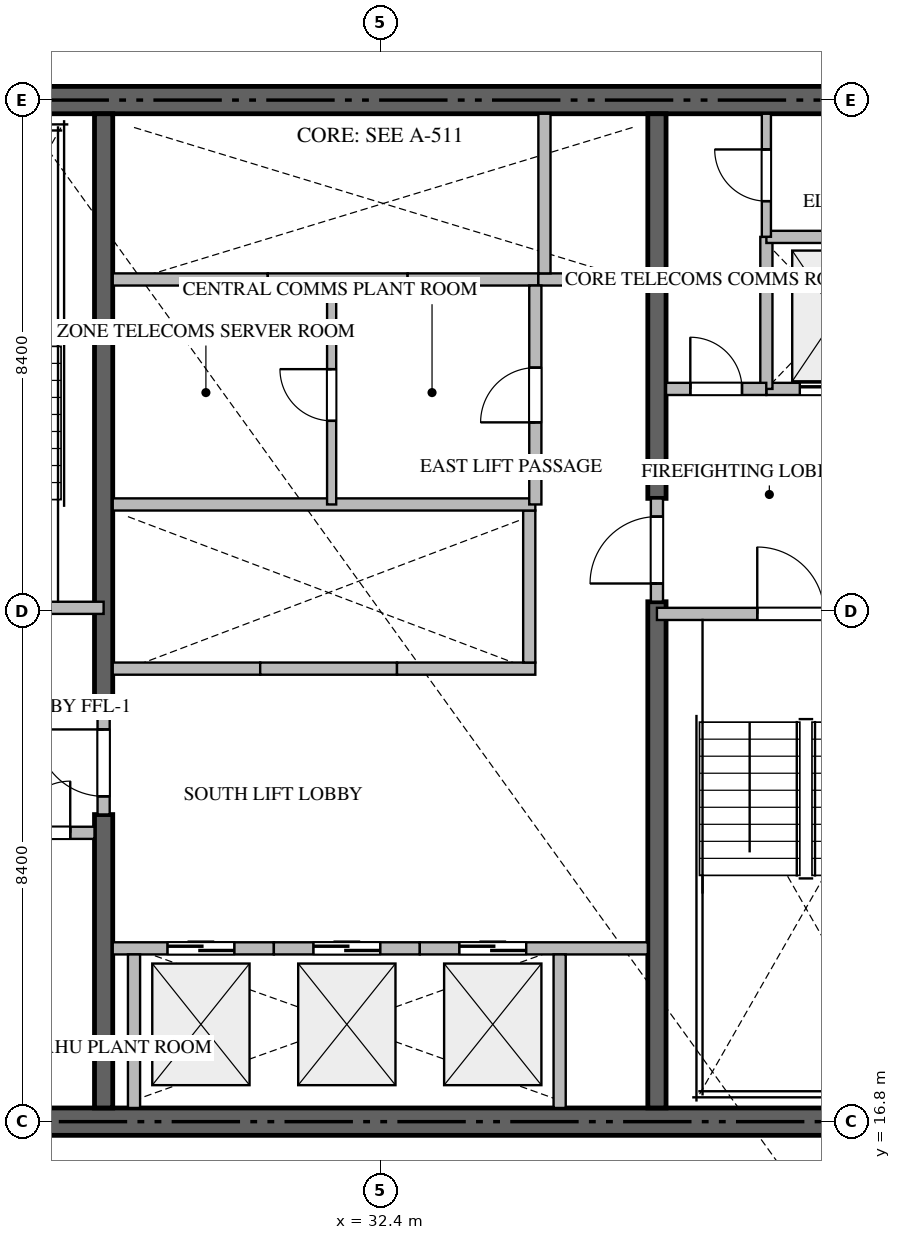
"""IFC4 building model, lengths in metres.
Left out: names, types, materials, properties, quantities, classifications, styles, units other than length and angle.
Written with IfcOpenShell. Run it as: python <this file> out.ifc"""

import sys

from ifc_helpers import new_model, si_unit, direction, frame, frame_2d, origin, place, context, subcontext, project, spatial, rectangle, extrude, source, transform, mapped, element, fill, save


model = new_model("IFC4")
c1 = context("Model", 3, precision=1e-05, world=origin(), true_north=direction((0.0, 1.0)))
c2 = subcontext(c1, "Body", "Model", "MODEL_VIEW")
j1 = project(units=[si_unit("LENGTHUNIT", "METRE"), si_unit("PLANEANGLEUNIT", "RADIAN")], contexts=[c1])
p1 = place(None, origin())
s1 = spatial("IfcSite", under=j1, at=p1, CompositionType="ELEMENT")
p2 = place(p1, origin())
s2 = spatial("IfcBuilding", under=s1, at=p2, CompositionType="ELEMENT")
p3 = place(p2, frame((0.0, 0.0, 90.45)))
s3 = spatial("IfcBuildingStorey", under=s2, at=p3, CompositionType="ELEMENT", Elevation=90.45)
for number, where, z_axis, x_axis in (
    (1, (23.4, 16.8, -0.26), (0.0, 0.0, 1.0), (1.0, 0.0, 0.0)),
    (2, (41.4, 33.6, -0.26), (0.0, 0.0, 1.0), (-1.0, 0.0, 0.0)),
):
    element("IfcWall", number, at=place(p3, frame(where, z_axis=z_axis, x_axis=x_axis)), inside=s3, PredefinedType="SHEAR", context=c2, shape_type="SweptSolid", body=[
        extrude(rectangle(XDim=18.0, YDim=0.45, at=frame_2d((9.0, 0.0))), origin(), (0.0, 0.0, 1.0), 3.748),
    ])
p4 = place(p3, frame((27.85, 17.025, -0.26), z_axis=(0.0, 0.0, 1.0), x_axis=(0.0, 1.0, 0.0)))
e3 = element("IfcWall", 3, at=p4, inside=s3, PredefinedType="SHEAR", context=c2, shape_type="SweptSolid", body=[
    extrude(rectangle(XDim=4.825, YDim=0.3, at=frame_2d((2.413, 0.0))), origin(), (0.0, 0.0, 1.0), 3.748),
])
p5 = place(p3, frame((27.85, 23.55, -0.26), z_axis=(0.0, 0.0, 1.0), x_axis=(0.0, 1.0, 0.0)))
e4 = element("IfcWall", 4, at=p5, inside=s3, PredefinedType="SHEAR", context=c2, shape_type="SweptSolid", body=[
    extrude(rectangle(XDim=9.825, YDim=0.3, at=frame_2d((4.913, 0.0))), origin(), (0.0, 0.0, 1.0), 3.748),
])
p6 = place(p3, frame((36.95, 17.025, -0.26), z_axis=(0.0, 0.0, 1.0), x_axis=(0.0, 1.0, 0.0)))
e5 = element("IfcWall", 5, at=p6, inside=s3, PredefinedType="SHEAR", context=c2, shape_type="SweptSolid", body=[
    extrude(rectangle(XDim=8.325, YDim=0.3, at=frame_2d((4.163, 0.0))), origin(), (0.0, 0.0, 1.0), 3.748),
])
p7 = place(p3, frame((36.95, 27.05, -0.26), z_axis=(0.0, 0.0, 1.0), x_axis=(0.0, 1.0, 0.0)))
e6 = element("IfcWall", 6, at=p7, inside=s3, PredefinedType="SHEAR", context=c2, shape_type="SweptSolid", body=[
    extrude(rectangle(XDim=6.325, YDim=0.3, at=frame_2d((3.163, 0.0))), origin(), (0.0, 0.0, 1.0), 3.748),
])
p8 = place(p3, frame((23.4, 25.25, 0.0), z_axis=(0.0, 0.0, 1.0), x_axis=(1.0, 0.0, 0.0)))
e7 = element("IfcWall", 7, at=p8, inside=s3, PredefinedType="STANDARD", context=c2, shape_type="SweptSolid", body=[
    extrude(rectangle(XDim=4.45, YDim=0.2, at=frame_2d((2.225, 0.0))), origin(), (0.0, 0.0, 1.0), 3.49),
])
p9 = place(p8, frame((1.65, 0.0, 0.0)))
e8 = element("IfcOpeningElement", 8, at=p9, cuts=e7, PredefinedType="OPENING", context=c2, shape_type="SweptSolid", body=[
    extrude(rectangle(XDim=1.1, YDim=2.15, at=frame_2d((0.55, 1.075))), frame((0.0, 0.11, 0.0), z_axis=(0.0, -1.0, 0.0), x_axis=(1.0, 0.0, 0.0)), (0.0, 0.0, 1.0), 0.22),
])
p10 = place(p3, frame((36.95, 25.15, 0.0), z_axis=(0.0, 0.0, 1.0), x_axis=(1.0, 0.0, 0.0)))
e9 = element("IfcWall", 9, at=p10, inside=s3, PredefinedType="STANDARD", context=c2, shape_type="SweptSolid", body=[
    extrude(rectangle(XDim=4.45, YDim=0.2, at=frame_2d((2.225, 0.0))), origin(), (0.0, 0.0, 1.0), 3.49),
])
p11 = place(p10, frame((1.65, 0.0, 0.0)))
e10 = element("IfcOpeningElement", 10, at=p11, cuts=e9, PredefinedType="OPENING", context=c2, shape_type="SweptSolid", body=[
    extrude(rectangle(XDim=1.1, YDim=2.15, at=frame_2d((0.55, 1.075))), frame((0.0, 0.11, 0.0), z_axis=(0.0, -1.0, 0.0), x_axis=(1.0, 0.0, 0.0)), (0.0, 0.0, 1.0), 0.22),
])
p12 = place(p3, frame((38.75, 28.85, 0.0), z_axis=(0.0, 0.0, 1.0), x_axis=(1.0, 0.0, 0.0)))
e11 = element("IfcWall", 11, at=p12, inside=s3, PredefinedType="STANDARD", context=c2, shape_type="SweptSolid", body=[
    extrude(rectangle(XDim=2.425, YDim=0.2, at=frame_2d((1.212, 0.0))), origin(), (0.0, 0.0, 1.0), 3.49),
])
p13 = place(p12, frame((0.55, 0.0, 0.0)))
e12 = element("IfcOpeningElement", 12, at=p13, cuts=e11, PredefinedType="OPENING", context=c2, shape_type="SweptSolid", body=[
    extrude(rectangle(XDim=1.2, YDim=2.2, at=frame_2d((0.6, 1.1))), frame((0.0, 0.11, 0.0), z_axis=(0.0, -1.0, 0.0), x_axis=(1.0, 0.0, 0.0)), (0.0, 0.0, 1.0), 0.22),
])
p14 = place(p3, frame((28.0, 19.65, 0.0), z_axis=(0.0, 0.0, 1.0), x_axis=(1.0, 0.0, 0.0)))
e13 = element("IfcWall", 13, at=p14, inside=s3, PredefinedType="STANDARD", context=c2, shape_type="SweptSolid", body=[
    extrude(rectangle(XDim=2.65, YDim=0.2, at=frame_2d((1.325, 0.0))), origin(), (0.0, 0.0, 1.0), 3.49),
])
p15 = place(p14, frame((0.9, 0.0, 0.0)))
e14 = element("IfcOpeningElement", 14, at=p15, cuts=e13, PredefinedType="OPENING", context=c2, shape_type="SweptSolid", body=[
    extrude(rectangle(XDim=1.1, YDim=2.2, at=frame_2d((0.55, 1.1))), frame((0.0, 0.11, 0.0), z_axis=(0.0, -1.0, 0.0), x_axis=(1.0, 0.0, 0.0)), (0.0, 0.0, 1.0), 0.22),
])
p16 = place(p3, frame((28.35, 17.025, 0.0), z_axis=(0.0, 0.0, 1.0), x_axis=(0.0, 1.0, 0.0)))
e15 = element("IfcWall", 15, at=p16, inside=s3, PredefinedType="STANDARD", context=c2, shape_type="SweptSolid", body=[
    extrude(rectangle(XDim=2.525, YDim=0.2, at=frame_2d((1.263, 0.0))), origin(), (0.0, 0.0, 1.0), 3.49),
])
p17 = place(p3, frame((30.65, 19.65, 0.0), z_axis=(0.0, 0.0, 1.0), x_axis=(1.0, 0.0, 0.0)))
e16 = element("IfcWall", 16, at=p17, inside=s3, PredefinedType="STANDARD", context=c2, shape_type="SweptSolid", body=[
    extrude(rectangle(XDim=2.4, YDim=0.2, at=frame_2d((1.2, 0.0))), origin(), (0.0, 0.0, 1.0), 3.49),
])
p18 = place(p17, frame((0.65, 0.0, 0.0)))
e17 = element("IfcOpeningElement", 17, at=p18, cuts=e16, PredefinedType="OPENING", context=c2, shape_type="SweptSolid", body=[
    extrude(rectangle(XDim=1.1, YDim=2.2, at=frame_2d((0.55, 1.1))), frame((0.0, 0.11, 0.0), z_axis=(0.0, -1.0, 0.0), x_axis=(1.0, 0.0, 0.0)), (0.0, 0.0, 1.0), 0.22),
])
p19 = place(p3, frame((33.05, 19.65, 0.0), z_axis=(0.0, 0.0, 1.0), x_axis=(1.0, 0.0, 0.0)))
e18 = element("IfcWall", 18, at=p19, inside=s3, PredefinedType="STANDARD", context=c2, shape_type="SweptSolid", body=[
    extrude(rectangle(XDim=3.75, YDim=0.2, at=frame_2d((1.875, 0.0))), origin(), (0.0, 0.0, 1.0), 3.49),
])
p20 = place(p19, frame((0.65, 0.0, 0.0)))
e19 = element("IfcOpeningElement", 19, at=p20, cuts=e18, PredefinedType="OPENING", context=c2, shape_type="SweptSolid", body=[
    extrude(rectangle(XDim=1.1, YDim=2.2, at=frame_2d((0.55, 1.1))), frame((0.0, 0.11, 0.0), z_axis=(0.0, -1.0, 0.0), x_axis=(1.0, 0.0, 0.0)), (0.0, 0.0, 1.0), 0.22),
])
p21 = place(p3, frame((35.35, 17.025, 0.0), z_axis=(0.0, 0.0, 1.0), x_axis=(0.0, 1.0, 0.0)))
e20 = element("IfcWall", 20, at=p21, inside=s3, PredefinedType="STANDARD", context=c2, shape_type="SweptSolid", body=[
    extrude(rectangle(XDim=2.525, YDim=0.2, at=frame_2d((1.263, 0.0))), origin(), (0.0, 0.0, 1.0), 3.49),
])
p22 = place(p3, frame((28.0, 24.25, 0.0), z_axis=(0.0, 0.0, 1.0), x_axis=(1.0, 0.0, 0.0)))
e21 = element("IfcWall", 21, at=p22, inside=s3, PredefinedType="STANDARD", context=c2, shape_type="SweptSolid", body=[
    extrude(rectangle(XDim=2.425, YDim=0.2, at=frame_2d((1.212, 0.0))), origin(), (0.0, 0.0, 1.0), 3.49),
])
p23 = place(p3, frame((30.425, 24.25, 0.0), z_axis=(0.0, 0.0, 1.0), x_axis=(1.0, 0.0, 0.0)))
e22 = element("IfcWall", 22, at=p23, inside=s3, PredefinedType="STANDARD", context=c2, shape_type="SweptSolid", body=[
    extrude(rectangle(XDim=2.25, YDim=0.2, at=frame_2d((1.125, 0.0))), origin(), (0.0, 0.0, 1.0), 3.49),
])
p24 = place(p3, frame((32.675, 24.25, 0.0), z_axis=(0.0, 0.0, 1.0), x_axis=(1.0, 0.0, 0.0)))
e23 = element("IfcWall", 23, at=p24, inside=s3, PredefinedType="STANDARD", context=c2, shape_type="SweptSolid", body=[
    extrude(rectangle(XDim=2.275, YDim=0.2, at=frame_2d((1.137, 0.0))), origin(), (0.0, 0.0, 1.0), 3.49),
])
p25 = place(p3, frame((34.85, 24.35, 0.0), z_axis=(0.0, 0.0, 1.0), x_axis=(0.0, 1.0, 0.0)))
e24 = element("IfcWall", 24, at=p25, inside=s3, PredefinedType="STANDARD", context=c2, shape_type="SweptSolid", body=[
    extrude(rectangle(XDim=2.5, YDim=0.2, at=frame_2d((1.25, 0.0))), origin(), (0.0, 0.0, 1.0), 3.49),
])
p26 = place(p3, frame((28.0, 30.65, 0.0), z_axis=(0.0, 0.0, 1.0), x_axis=(1.0, 0.0, 0.0)))
e25 = element("IfcWall", 25, at=p26, inside=s3, PredefinedType="STANDARD", context=c2, shape_type="SweptSolid", body=[
    extrude(rectangle(XDim=2.55, YDim=0.2, at=frame_2d((1.275, 0.0))), origin(), (0.0, 0.0, 1.0), 3.49),
])
p27 = place(p3, frame((30.55, 30.65, 0.0), z_axis=(0.0, 0.0, 1.0), x_axis=(1.0, 0.0, 0.0)))
e26 = element("IfcWall", 26, at=p27, inside=s3, PredefinedType="STANDARD", context=c2, shape_type="SweptSolid", body=[
    extrude(rectangle(XDim=2.3, YDim=0.2, at=frame_2d((1.15, 0.0))), origin(), (0.0, 0.0, 1.0), 3.49),
])
p28 = place(p3, frame((32.85, 30.65, 0.0), z_axis=(0.0, 0.0, 1.0), x_axis=(1.0, 0.0, 0.0)))
e27 = element("IfcWall", 27, at=p28, inside=s3, PredefinedType="STANDARD", context=c2, shape_type="SweptSolid", body=[
    extrude(rectangle(XDim=2.15, YDim=0.2, at=frame_2d((1.075, 0.0))), origin(), (0.0, 0.0, 1.0), 3.49),
])
p29 = place(p3, frame((35.0, 30.65, 0.0), z_axis=(0.0, 0.0, 1.0), x_axis=(1.0, 0.0, 0.0)))
e28 = element("IfcWall", 28, at=p29, inside=s3, PredefinedType="STANDARD", context=c2, shape_type="SweptSolid", body=[
    extrude(rectangle(XDim=1.8, YDim=0.2, at=frame_2d((0.9, 0.0))), origin(), (0.0, 0.0, 1.0), 3.49),
])
p30 = place(p3, frame((35.1, 30.75, 0.0), z_axis=(0.0, 0.0, 1.0), x_axis=(0.0, 1.0, 0.0)))
e29 = element("IfcWall", 29, at=p30, inside=s3, PredefinedType="STANDARD", context=c2, shape_type="SweptSolid", body=[
    extrude(rectangle(XDim=2.625, YDim=0.2, at=frame_2d((1.312, 0.0))), origin(), (0.0, 0.0, 1.0), 3.49),
])
p31 = place(p3, frame((26.052, 21.55, 0.0), z_axis=(0.0, 0.0, 1.0), x_axis=(1.0, 0.0, 0.0)))
e30 = element("IfcWall", 30, at=p31, inside=s3, PredefinedType="STANDARD", context=c2, shape_type="SweptSolid", body=[
    extrude(rectangle(XDim=1.648, YDim=0.2, at=frame_2d((0.824, 0.0))), origin(), (0.0, 0.0, 1.0), 3.49),
])
p32 = place(p31, frame((0.399, 0.0, 0.0)))
e31 = element("IfcOpeningElement", 31, at=p32, cuts=e30, PredefinedType="OPENING", context=c2, shape_type="SweptSolid", body=[
    extrude(rectangle(XDim=0.85, YDim=2.1, at=frame_2d((0.425, 1.05))), frame((0.0, 0.11, 0.0), z_axis=(0.0, -1.0, 0.0), x_axis=(1.0, 0.0, 0.0)), (0.0, 0.0, 1.0), 0.22),
])
p33 = place(p3, frame((38.75, 28.85, 0.0), z_axis=(0.0, 0.0, 1.0), x_axis=(0.0, 1.0, 0.0)))
e32 = element("IfcWall", 32, at=p33, inside=s3, PredefinedType="STANDARD", context=c2, shape_type="SweptSolid", body=[
    extrude(rectangle(XDim=2.5, YDim=0.2, at=frame_2d((1.25, 0.0))), origin(), (0.0, 0.0, 1.0), 3.49),
])
p34 = place(p3, frame((38.75, 31.35, 0.0), z_axis=(0.0, 0.0, 1.0), x_axis=(1.0, 0.0, 0.0)))
e33 = element("IfcWall", 33, at=p34, inside=s3, PredefinedType="STANDARD", context=c2, shape_type="SweptSolid", body=[
    extrude(rectangle(XDim=2.425, YDim=0.2, at=frame_2d((1.212, 0.0))), origin(), (0.0, 0.0, 1.0), 3.49),
])
p35 = place(p3, frame((37.1, 28.85, 0.0), z_axis=(0.0, 0.0, 1.0), x_axis=(1.0, 0.0, 0.0)))
e34 = element("IfcWall", 34, at=p35, inside=s3, PredefinedType="STANDARD", context=c2, shape_type="SweptSolid", body=[
    extrude(rectangle(XDim=1.648, YDim=0.2, at=frame_2d((0.824, 0.0))), origin(), (0.0, 0.0, 1.0), 3.49),
])
p36 = place(p35, frame((0.399, 0.0, 0.0)))
e35 = element("IfcOpeningElement", 35, at=p36, cuts=e34, PredefinedType="OPENING", context=c2, shape_type="SweptSolid", body=[
    extrude(rectangle(XDim=0.85, YDim=2.1, at=frame_2d((0.425, 1.05))), frame((0.0, 0.11, 0.0), z_axis=(0.0, -1.0, 0.0), x_axis=(1.0, 0.0, 0.0)), (0.0, 0.0, 1.0), 0.22),
])
p37 = place(p3, frame((27.85, 21.852, 0.0), z_axis=(0.0, 0.0, 1.0), x_axis=(0.0, 1.0, 0.0)))
e36 = element("IfcWall", 36, at=p37, inside=s3, PredefinedType="STANDARD", context=c2, shape_type="SweptSolid", body=[
    extrude(rectangle(XDim=1.696, YDim=0.2, at=frame_2d((0.848, 0.0))), origin(), (0.0, 0.0, 1.0), 3.49),
])
p38 = place(p37, frame((0.298, 0.0, 0.0)))
e37 = element("IfcOpeningElement", 37, at=p38, cuts=e36, PredefinedType="OPENING", context=c2, shape_type="SweptSolid", body=[
    extrude(rectangle(XDim=1.1, YDim=2.15, at=frame_2d((0.55, 1.075))), frame((0.0, 0.11, 0.0), z_axis=(0.0, -1.0, 0.0), x_axis=(1.0, 0.0, 0.0)), (0.0, 0.0, 1.0), 0.22),
])
p39 = place(p3, frame((36.95, 25.352, 0.0), z_axis=(0.0, 0.0, 1.0), x_axis=(0.0, 1.0, 0.0)))
e38 = element("IfcWall", 38, at=p39, inside=s3, PredefinedType="STANDARD", context=c2, shape_type="SweptSolid", body=[
    extrude(rectangle(XDim=1.696, YDim=0.2, at=frame_2d((0.848, 0.0))), origin(), (0.0, 0.0, 1.0), 3.49),
])
p40 = place(p39, frame((0.298, 0.0, 0.0)))
e39 = element("IfcOpeningElement", 39, at=p40, cuts=e38, PredefinedType="OPENING", context=c2, shape_type="SweptSolid", body=[
    extrude(rectangle(XDim=1.1, YDim=2.15, at=frame_2d((0.55, 1.075))), frame((0.0, 0.11, 0.0), z_axis=(0.0, -1.0, 0.0), x_axis=(1.0, 0.0, 0.0)), (0.0, 0.0, 1.0), 0.22),
])
p41 = place(p3, frame((28.0, 26.95, 0.0), z_axis=(0.0, 0.0, 1.0), x_axis=(1.0, 0.0, 0.0)))
e40 = element("IfcWall", 40, at=p41, inside=s3, PredefinedType="STANDARD", context=c2, shape_type="SweptSolid", body=[
    extrude(rectangle(XDim=6.95, YDim=0.2, at=frame_2d((3.475, 0.0))), origin(), (0.0, 0.0, 1.0), 3.49),
])
p42 = place(p3, frame((38.75, 31.352, 0.0), z_axis=(0.0, 0.0, 1.0), x_axis=(0.0, 1.0, 0.0)))
e41 = element("IfcWall", 41, at=p42, inside=s3, PredefinedType="PARTITIONING", context=c2, shape_type="SweptSolid", body=[
    extrude(rectangle(XDim=2.023, YDim=0.15, at=frame_2d((1.011, 0.0))), origin(), (0.0, 0.0, 1.0), 3.49),
])
p43 = place(p42, frame((0.586, 0.0, 0.0)))
e42 = element("IfcOpeningElement", 42, at=p43, cuts=e41, PredefinedType="OPENING", context=c2, shape_type="SweptSolid", body=[
    extrude(rectangle(XDim=0.85, YDim=2.1, at=frame_2d((0.425, 1.05))), frame((0.0, 0.085, 0.0), z_axis=(0.0, -1.0, 0.0), x_axis=(1.0, 0.0, 0.0)), (0.0, 0.0, 1.0), 0.17),
])
p44 = place(p3, frame((34.95, 26.95, 0.0), z_axis=(0.0, 0.0, 1.0), x_axis=(0.0, 1.0, 0.0)))
e43 = element("IfcWall", 43, at=p44, inside=s3, PredefinedType="STANDARD", context=c2, shape_type="SweptSolid", body=[
    extrude(rectangle(XDim=3.6, YDim=0.2, at=frame_2d((1.8, 0.0))), origin(), (0.0, 0.0, 1.0), 3.49),
])
p45 = place(p44, frame((1.35, 0.0, 0.0)))
e44 = element("IfcOpeningElement", 44, at=p45, cuts=e43, PredefinedType="OPENING", context=c2, shape_type="SweptSolid", body=[
    extrude(rectangle(XDim=0.9, YDim=2.1, at=frame_2d((0.45, 1.05))), frame((0.0, 0.11, 0.0), z_axis=(0.0, -1.0, 0.0), x_axis=(1.0, 0.0, 0.0)), (0.0, 0.0, 1.0), 0.22),
])
p46 = place(p3, frame((31.6, 26.95, 0.0), z_axis=(0.0, 0.0, 1.0), x_axis=(0.0, 1.0, 0.0)))
e45 = element("IfcWall", 45, at=p46, inside=s3, PredefinedType="PARTITIONING", context=c2, shape_type="SweptSolid", body=[
    extrude(rectangle(XDim=3.6, YDim=0.15, at=frame_2d((1.8, 0.0))), origin(), (0.0, 0.0, 1.0), 3.49),
])
p47 = place(p46, frame((1.375, 0.0, 0.0)))
e46 = element("IfcOpeningElement", 46, at=p47, cuts=e45, PredefinedType="OPENING", context=c2, shape_type="SweptSolid", body=[
    extrude(rectangle(XDim=0.85, YDim=2.1, at=frame_2d((0.425, 1.05))), frame((0.0, 0.085, 0.0), z_axis=(0.0, -1.0, 0.0), x_axis=(1.0, 0.0, 0.0)), (0.0, 0.0, 1.0), 0.17),
])
m1 = source(origin(), c2, "Body", "SweptSolid", [
    extrude(rectangle(XDim=1.1, YDim=2.15, at=frame_2d((0.55, 1.075))), frame((0.0, 0.025, 0.0), z_axis=(0.0, -1.0, 0.0), x_axis=(1.0, 0.0, 0.0)), (0.0, 0.0, 1.0), 0.05),
])
p48 = place(p11, origin())
e47 = element("IfcDoor", 47, at=p48, inside=s3, OperationType="SINGLE_SWING_LEFT", PredefinedType="DOOR", context=c2, shape_type="MappedRepresentation", body=[
    mapped(m1, transform((0.0, 0.0, 0.0), scale=1.0)),
])
fill(e10, e47)
m2 = source(origin(), c2, "Body", "SweptSolid", [
    extrude(rectangle(XDim=1.2, YDim=2.2, at=frame_2d((0.6, 1.1))), frame((0.0, 0.025, 0.0), z_axis=(0.0, -1.0, 0.0), x_axis=(1.0, 0.0, 0.0)), (0.0, 0.0, 1.0), 0.05),
])
p49 = place(p13, origin())
e48 = element("IfcDoor", 48, at=p49, inside=s3, OperationType="DOUBLE_DOOR_SLIDING", PredefinedType="DOOR", context=c2, shape_type="MappedRepresentation", body=[
    mapped(m2, transform((0.0, 0.0, 0.0), scale=1.0)),
])
fill(e12, e48)
m3 = source(origin(), c2, "Body", "SweptSolid", [
    extrude(rectangle(XDim=1.1, YDim=2.2, at=frame_2d((0.55, 1.1))), frame((0.0, 0.025, 0.0), z_axis=(0.0, -1.0, 0.0), x_axis=(1.0, 0.0, 0.0)), (0.0, 0.0, 1.0), 0.05),
])
p50 = place(p15, origin())
e49 = element("IfcDoor", 49, at=p50, inside=s3, OperationType="DOUBLE_DOOR_SLIDING", PredefinedType="DOOR", context=c2, shape_type="MappedRepresentation", body=[
    mapped(m3, transform((0.0, 0.0, 0.0), scale=1.0)),
])
fill(e14, e49)
p51 = place(p18, origin())
e50 = element("IfcDoor", 50, at=p51, inside=s3, OperationType="DOUBLE_DOOR_SLIDING", PredefinedType="DOOR", context=c2, shape_type="MappedRepresentation", body=[
    mapped(m3, transform((0.0, 0.0, 0.0), scale=1.0)),
])
fill(e17, e50)
p52 = place(p20, origin())
e51 = element("IfcDoor", 51, at=p52, inside=s3, OperationType="DOUBLE_DOOR_SLIDING", PredefinedType="DOOR", context=c2, shape_type="MappedRepresentation", body=[
    mapped(m3, transform((0.0, 0.0, 0.0), scale=1.0)),
])
fill(e19, e51)
m4 = source(origin(), c2, "Body", "SweptSolid", [
    extrude(rectangle(XDim=0.85, YDim=2.1, at=frame_2d((0.425, 1.05))), frame((0.0, 0.025, 0.0), z_axis=(0.0, -1.0, 0.0), x_axis=(1.0, 0.0, 0.0)), (0.0, 0.0, 1.0), 0.05),
])
p53 = place(p32, origin())
e52 = element("IfcDoor", 52, at=p53, inside=s3, OperationType="SINGLE_SWING_RIGHT", PredefinedType="DOOR", context=c2, shape_type="MappedRepresentation", body=[
    mapped(m4, transform((0.0, 0.0, 0.0), scale=1.0)),
])
fill(e31, e52)
p54 = place(p36, origin())
e53 = element("IfcDoor", 53, at=p54, inside=s3, OperationType="SINGLE_SWING_LEFT", PredefinedType="DOOR", context=c2, shape_type="MappedRepresentation", body=[
    mapped(m4, transform((0.0, 0.0, 0.0), scale=1.0)),
])
fill(e35, e53)
p55 = place(p38, origin())
e54 = element("IfcDoor", 54, at=p55, inside=s3, OperationType="SINGLE_SWING_RIGHT", PredefinedType="DOOR", context=c2, shape_type="MappedRepresentation", body=[
    mapped(m1, transform((0.0, 0.0, 0.0), scale=1.0)),
])
fill(e37, e54)
p56 = place(p40, origin())
e55 = element("IfcDoor", 55, at=p56, inside=s3, OperationType="SINGLE_SWING_LEFT", PredefinedType="DOOR", context=c2, shape_type="MappedRepresentation", body=[
    mapped(m1, transform((0.0, 0.0, 0.0), scale=1.0)),
])
fill(e39, e55)
p57 = place(p43, origin())
e56 = element("IfcDoor", 56, at=p57, inside=s3, OperationType="SINGLE_SWING_RIGHT", PredefinedType="DOOR", context=c2, shape_type="MappedRepresentation", body=[
    mapped(m4, transform((0.0, 0.0, 0.0), scale=1.0)),
])
fill(e42, e56)
m5 = source(origin(), c2, "Body", "SweptSolid", [
    extrude(rectangle(XDim=0.9, YDim=2.1, at=frame_2d((0.45, 1.05))), frame((0.0, 0.025, 0.0), z_axis=(0.0, -1.0, 0.0), x_axis=(1.0, 0.0, 0.0)), (0.0, 0.0, 1.0), 0.05),
])
p58 = place(p45, origin())
e57 = element("IfcDoor", 57, at=p58, inside=s3, OperationType="SINGLE_SWING_LEFT", PredefinedType="DOOR", context=c2, shape_type="MappedRepresentation", body=[
    mapped(m5, transform((0.0, 0.0, 0.0), scale=1.0)),
])
fill(e44, e57)
p59 = place(p47, origin())
e58 = element("IfcDoor", 58, at=p59, inside=s3, OperationType="SINGLE_SWING_RIGHT", PredefinedType="DOOR", context=c2, shape_type="MappedRepresentation", body=[
    mapped(m4, transform((0.0, 0.0, 0.0), scale=1.0)),
])
fill(e46, e58)
save(model, sys.argv[1])
